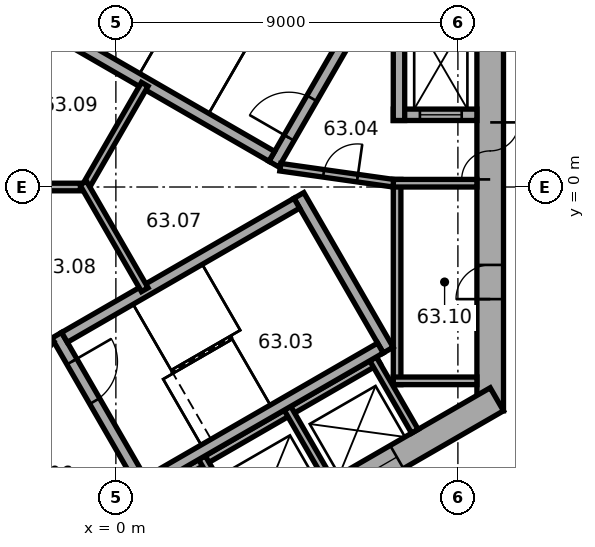
"""IFC4 building model, lengths in metres.
Left out: names, types, materials, properties, quantities, classifications, styles, units other than length and angle.
Written with IfcOpenShell. Run it as: python <this file> out.ifc"""

import sys

from ifc_helpers import new_model, si_unit, direction, frame, frame_2d, origin, place, context, subcontext, project, spatial, rectangle, extrude, element, fill, save


model = new_model("IFC4")
c1 = context("Model", 3, precision=1e-05, world=origin(), true_north=direction((0.0, 1.0)))
c2 = subcontext(c1, "Body", "Model", "MODEL_VIEW")
j1 = project(units=[si_unit("LENGTHUNIT", "METRE"), si_unit("PLANEANGLEUNIT", "RADIAN")], contexts=[c1])
p1 = place(None, origin())
s1 = spatial("IfcSite", under=j1, at=p1, CompositionType="ELEMENT")
p2 = place(p1, origin())
s2 = spatial("IfcBuilding", under=s1, at=p2, CompositionType="ELEMENT")
p3 = place(p2, frame((0.0, 0.0, 255.0)))
s3 = spatial("IfcBuildingStorey", under=s2, at=p3, CompositionType="ELEMENT", Elevation=255.0)
p4 = place(p3, frame((9.85, -5.889, 0.0), z_axis=(0.0, 0.0, 1.0), x_axis=(0.0, 1.0, 0.0)))
e1 = element("IfcWall", 1, at=p4, inside=s3, PredefinedType="SHEAR", context=c2, shape_type="SweptSolid", body=[
    extrude(rectangle(XDim=11.778, YDim=0.7, at=frame_2d((5.889, 0.0))), origin(), (0.0, 0.0, 1.0), 4.8),
])
p5 = place(p4, frame((6.089, 0.0, 0.0)))
e2 = element("IfcOpeningElement", 2, at=p5, cuts=e1, PredefinedType="OPENING", context=c2, shape_type="SweptSolid", body=[
    extrude(rectangle(XDim=1.5, YDim=2.1, at=frame_2d((0.75, 1.05))), frame((0.0, 0.36, 0.0), z_axis=(0.0, -1.0, 0.0), x_axis=(1.0, 0.0, 0.0)), (0.0, 0.0, 1.0), 0.72),
])
p6 = place(p4, frame((2.939, 0.0, 0.0)))
e3 = element("IfcOpeningElement", 3, at=p6, cuts=e1, PredefinedType="OPENING", context=c2, shape_type="SweptSolid", body=[
    extrude(rectangle(XDim=0.9, YDim=2.1, at=frame_2d((0.45, 1.05))), frame((0.0, 0.36, 0.0), z_axis=(0.0, -1.0, 0.0), x_axis=(1.0, 0.0, 0.0)), (0.0, 0.0, 1.0), 0.72),
])
p7 = place(p3, frame((-10.025, -5.586, 0.0), z_axis=(0.0, 0.0, 1.0), x_axis=(0.866026453023, -0.499998182661, 0.0)))
e4 = element("IfcWall", 4, at=p7, inside=s3, PredefinedType="SHEAR", context=c2, shape_type="SweptSolid", body=[
    extrude(rectangle(XDim=11.778, YDim=0.7, at=frame_2d((5.889, 0.0))), origin(), (0.0, 0.0, 1.0), 4.8),
])
p8 = place(p7, frame((6.089, 0.0, 0.0)))
e5 = element("IfcOpeningElement", 5, at=p8, cuts=e4, PredefinedType="OPENING", context=c2, shape_type="SweptSolid", body=[
    extrude(rectangle(XDim=1.5, YDim=2.1, at=frame_2d((0.75, 1.05))), frame((0.0, 0.36, 0.0), z_axis=(0.0, -1.0, 0.0), x_axis=(1.0, 0.0, 0.0)), (0.0, 0.0, 1.0), 0.72),
])
p9 = place(p7, frame((1.539, 0.0, 0.0)))
e6 = element("IfcOpeningElement", 6, at=p9, cuts=e4, PredefinedType="OPENING", context=c2, shape_type="SweptSolid", body=[
    extrude(rectangle(XDim=1.1, YDim=2.1, at=frame_2d((0.55, 1.05))), frame((0.0, 0.36, 0.0), z_axis=(0.0, -1.0, 0.0), x_axis=(1.0, 0.0, 0.0)), (0.0, 0.0, 1.0), 0.72),
])
p10 = place(p7, frame((4.139, 0.0, 0.0)))
e7 = element("IfcOpeningElement", 7, at=p10, cuts=e4, PredefinedType="OPENING", context=c2, shape_type="SweptSolid", body=[
    extrude(rectangle(XDim=1.1, YDim=2.1, at=frame_2d((0.55, 1.05))), frame((0.0, 0.36, 0.0), z_axis=(0.0, -1.0, 0.0), x_axis=(1.0, 0.0, 0.0)), (0.0, 0.0, 1.0), 0.72),
])
p11 = place(p3, frame((-0.175, -11.475, 0.0), z_axis=(0.0, 0.0, 1.0), x_axis=(0.866026453023, 0.499998182661, 0.0)))
e8 = element("IfcWall", 8, at=p11, inside=s3, PredefinedType="SHEAR", context=c2, shape_type="SweptSolid", body=[
    extrude(rectangle(XDim=11.778, YDim=0.7, at=frame_2d((5.889, 0.0))), origin(), (0.0, 0.0, 1.0), 4.8),
])
p12 = place(p11, frame((2.439, 0.0, 0.0)))
e9 = element("IfcOpeningElement", 9, at=p12, cuts=e8, PredefinedType="OPENING", context=c2, shape_type="SweptSolid", body=[
    extrude(rectangle(XDim=1.1, YDim=2.1, at=frame_2d((0.55, 1.05))), frame((0.0, 0.36, 0.0), z_axis=(0.0, -1.0, 0.0), x_axis=(1.0, 0.0, 0.0)), (0.0, 0.0, 1.0), 0.72),
])
p13 = place(p11, frame((5.039, 0.0, 0.0)))
e10 = element("IfcOpeningElement", 10, at=p13, cuts=e8, PredefinedType="OPENING", context=c2, shape_type="SweptSolid", body=[
    extrude(rectangle(XDim=1.1, YDim=2.1, at=frame_2d((0.55, 1.05))), frame((0.0, 0.36, 0.0), z_axis=(0.0, -1.0, 0.0), x_axis=(1.0, 0.0, 0.0)), (0.0, 0.0, 1.0), 0.72),
])
p14 = place(p11, frame((7.639, 0.0, 0.0)))
e11 = element("IfcOpeningElement", 11, at=p14, cuts=e8, PredefinedType="OPENING", context=c2, shape_type="SweptSolid", body=[
    extrude(rectangle(XDim=1.1, YDim=2.1, at=frame_2d((0.55, 1.05))), frame((0.0, 0.36, 0.0), z_axis=(0.0, -1.0, 0.0), x_axis=(1.0, 0.0, 0.0)), (0.0, 0.0, 1.0), 0.72),
])
p15 = place(p3, frame((7.4, -5.2, 0.0), z_axis=(0.0, 0.0, 1.0), x_axis=(0.0, 1.0, 0.0)))
e12 = element("IfcWall", 12, at=p15, inside=s3, PredefinedType="PARTITIONING", context=c2, shape_type="SweptSolid", body=[
    extrude(rectangle(XDim=5.4, YDim=0.2, at=frame_2d((2.7, 0.0))), origin(), (0.0, 0.0, 1.0), 4.52),
])
for number, where, z_axis, x_axis in (
    (13, (7.3, -5.1, 0.0), (0.0, 0.0, 1.0), (1.0, 0.0, 0.0)),
    (14, (7.3, 0.1, 0.0), (0.0, 0.0, 1.0), (1.0, 0.0, 0.0)),
):
    element("IfcWall", number, at=place(p3, frame(where, z_axis=z_axis, x_axis=x_axis)), inside=s3, PredefinedType="PARTITIONING", context=c2, shape_type="SweptSolid", body=[
        extrude(rectangle(XDim=2.2, YDim=0.2, at=frame_2d((1.1, 0.0))), origin(), (0.0, 0.0, 1.0), 4.52),
    ])
p16 = place(p3, frame((-0.024, -8.559, 0.0), z_axis=(0.0, 0.0, 1.0), x_axis=(0.866026010844, 0.49999894854, 0.0)))
e15 = element("IfcWall", 15, at=p16, inside=s3, PredefinedType="PARTITIONING", context=c2, shape_type="SweptSolid", body=[
    extrude(rectangle(XDim=8.0, YDim=0.2, at=frame_2d((4.0, 0.0))), origin(), (0.0, 0.0, 1.0), 4.52),
])
for number, where, z_axis, x_axis in (
    (16, (2.264, -7.122, 0.0), (0.0, 0.0, 1.0), (0.5, -0.866, 0.0)),
    (17, (4.516, -5.822, 0.0), (0.0, 0.0, 1.0), (0.5, -0.866, 0.0)),
    (18, (6.768, -4.522, 0.0), (0.0, 0.0, 1.0), (0.5, -0.866, 0.0)),
):
    element("IfcWall", number, at=place(p3, frame(where, z_axis=z_axis, x_axis=x_axis)), inside=s3, PredefinedType="PARTITIONING", context=c2, shape_type="SweptSolid", body=[
        extrude(rectangle(XDim=2.2, YDim=0.2, at=frame_2d((1.1, 0.0))), origin(), (0.0, 0.0, 1.0), 4.52),
    ])
p17 = place(p3, frame((4.158, 0.602, 0.0), z_axis=(0.0, 0.0, 1.0), x_axis=(0.499977259774, 0.866038532462, 0.0)))
e19 = element("IfcWall", 19, at=p17, inside=s3, PredefinedType="SHEAR", context=c2, shape_type="SweptSolid", body=[
    extrude(rectangle(XDim=4.7, YDim=0.3, at=frame_2d((2.35, 0.0))), origin(), (0.0, 0.0, 1.0), 4.52),
])
p18 = place(p17, frame((0.8, 0.0, 0.0)))
e20 = element("IfcOpeningElement", 20, at=p18, cuts=e19, PredefinedType="OPENING", context=c2, shape_type="SweptSolid", body=[
    extrude(rectangle(XDim=1.2, YDim=2.1, at=frame_2d((0.6, 1.05))), frame((0.0, 0.16, 0.0), z_axis=(0.0, -1.0, 0.0), x_axis=(1.0, 0.0, 0.0)), (0.0, 0.0, 1.0), 0.32),
])
p19 = place(p3, frame((4.103, 0.807, 0.0), z_axis=(0.0, 0.0, 1.0), x_axis=(-0.866027801685, 0.499995846692, 0.0)))
e21 = element("IfcWall", 21, at=p19, inside=s3, PredefinedType="SHEAR", context=c2, shape_type="SweptSolid", body=[
    extrude(rectangle(XDim=7.06, YDim=0.3, at=frame_2d((3.53, 0.0))), origin(), (0.0, 0.0, 1.0), 4.52),
])
p20 = place(p3, frame((-1.558, -3.902, 0.0), z_axis=(0.0, 0.0, 1.0), x_axis=(0.499977259774, -0.866038532462, 0.0)))
e22 = element("IfcWall", 22, at=p20, inside=s3, PredefinedType="SHEAR", context=c2, shape_type="SweptSolid", body=[
    extrude(rectangle(XDim=4.7, YDim=0.3, at=frame_2d((2.35, 0.0))), origin(), (0.0, 0.0, 1.0), 4.52),
])
p21 = place(p20, frame((0.8, 0.0, 0.0)))
e23 = element("IfcOpeningElement", 23, at=p21, cuts=e22, PredefinedType="OPENING", context=c2, shape_type="SweptSolid", body=[
    extrude(rectangle(XDim=1.2, YDim=2.1, at=frame_2d((0.6, 1.05))), frame((0.0, 0.16, 0.0), z_axis=(0.0, -1.0, 0.0), x_axis=(1.0, 0.0, 0.0)), (0.0, 0.0, 1.0), 0.32),
])
p22 = place(p3, frame((4.816, -0.222, 0.0), z_axis=(0.0, 0.0, 1.0), x_axis=(0.499977259774, -0.866038532462, 0.0)))
e24 = element("IfcWall", 24, at=p22, inside=s3, PredefinedType="SHEAR", context=c2, shape_type="SweptSolid", body=[
    extrude(rectangle(XDim=4.7, YDim=0.3, at=frame_2d((2.35, 0.0))), origin(), (0.0, 0.0, 1.0), 4.52),
])
for number, where, z_axis, x_axis in (
    (25, (-1.353, -3.957, 0.0), (0.0, 0.0, 1.0), (0.866, 0.5, 0.0)),
    (26, (0.847, -7.767, 0.0), (0.0, 0.0, 1.0), (0.866, 0.5, 0.0)),
):
    element("IfcWall", number, at=place(p3, frame(where, z_axis=z_axis, x_axis=x_axis)), inside=s3, PredefinedType="SHEAR", context=c2, shape_type="SweptSolid", body=[
        extrude(rectangle(XDim=7.06, YDim=0.3, at=frame_2d((3.53, 0.0))), origin(), (0.0, 0.0, 1.0), 4.52),
    ])
p23 = place(p3, frame((7.3, 1.9, 0.0), z_axis=(0.0, 0.0, 1.0), x_axis=(1.0, 0.0, 0.0)))
e27 = element("IfcWall", 27, at=p23, inside=s3, PredefinedType="SHEAR", context=c2, shape_type="SweptSolid", body=[
    extrude(rectangle(XDim=2.2, YDim=0.3, at=frame_2d((1.1, 0.0))), origin(), (0.0, 0.0, 1.0), 4.52),
])
p24 = place(p23, frame((0.7, 0.0, 0.0)))
e28 = element("IfcOpeningElement", 28, at=p24, cuts=e27, PredefinedType="OPENING", context=c2, shape_type="SweptSolid", body=[
    extrude(rectangle(XDim=1.1, YDim=2.1, at=frame_2d((0.55, 1.05))), frame((0.0, 0.16, 0.0), z_axis=(0.0, -1.0, 0.0), x_axis=(1.0, 0.0, 0.0)), (0.0, 0.0, 1.0), 0.32),
])
p25 = place(p3, frame((7.45, 1.75, 0.0), z_axis=(0.0, 0.0, 1.0), x_axis=(0.0, 1.0, 0.0)))
e29 = element("IfcWall", 29, at=p25, inside=s3, PredefinedType="SHEAR", context=c2, shape_type="SweptSolid", body=[
    extrude(rectangle(XDim=3.35, YDim=0.3, at=frame_2d((1.675, 0.0))), origin(), (0.0, 0.0, 1.0), 4.52),
])
p26 = place(p3, frame((4.327, 0.521, 0.0), z_axis=(0.0, 0.0, 1.0), x_axis=(0.990124376366, -0.14019172346, 0.0)))
e30 = element("IfcWall", 30, at=p26, inside=s3, PredefinedType="PARTITIONING", context=c2, shape_type="SweptSolid", body=[
    extrude(rectangle(XDim=3.002, YDim=0.2, at=frame_2d((1.501, 0.0))), origin(), (0.0, 0.0, 1.0), 4.52),
])
p27 = place(p26, frame((1.15, 0.0, 0.0)))
e31 = element("IfcOpeningElement", 31, at=p27, cuts=e30, PredefinedType="OPENING", context=c2, shape_type="SweptSolid", body=[
    extrude(rectangle(XDim=0.9, YDim=2.1, at=frame_2d((0.45, 1.05))), frame((0.0, 0.11, 0.0), z_axis=(0.0, -1.0, 0.0), x_axis=(1.0, 0.0, 0.0)), (0.0, 0.0, 1.0), 0.22),
])
p28 = place(p3, frame((-1.712, -4.008, 0.0), z_axis=(0.0, 0.0, 1.0), x_axis=(-0.616549420702, -0.787316208287, 0.0)))
e32 = element("IfcWall", 32, at=p28, inside=s3, PredefinedType="PARTITIONING", context=c2, shape_type="SweptSolid", body=[
    extrude(rectangle(XDim=3.002, YDim=0.2, at=frame_2d((1.501, 0.0))), origin(), (0.0, 0.0, 1.0), 4.52),
])
p29 = place(p28, frame((1.15, 0.0, 0.0)))
e33 = element("IfcOpeningElement", 33, at=p29, cuts=e32, PredefinedType="OPENING", context=c2, shape_type="SweptSolid", body=[
    extrude(rectangle(XDim=0.9, YDim=2.1, at=frame_2d((0.45, 1.05))), frame((0.0, 0.11, 0.0), z_axis=(0.0, -1.0, 0.0), x_axis=(1.0, 0.0, 0.0)), (0.0, 0.0, 1.0), 0.22),
])
p30 = place(p3, frame((-0.68, 0.0, 0.0), z_axis=(0.0, 0.0, 1.0), x_axis=(-1.0, 0.0, 0.0)))
e34 = element("IfcWall", 34, at=p30, inside=s3, PredefinedType="PARTITIONING", context=c2, shape_type="SweptSolid", body=[
    extrude(rectangle(XDim=2.04, YDim=0.2, at=frame_2d((1.02, 0.0))), origin(), (0.0, 0.0, 1.0), 4.52),
])
for number, where, z_axis, x_axis in (
    (35, (-0.86, -0.104, 0.0), (0.0, 0.0, 1.0), (0.5, 0.866, 0.0)),
    (36, (-0.86, 0.104, 0.0), (0.0, 0.0, 1.0), (0.5, -0.866, 0.0)),
):
    element("IfcWall", number, at=place(p3, frame(where, z_axis=z_axis, x_axis=x_axis)), inside=s3, PredefinedType="PARTITIONING", context=c2, shape_type="SweptSolid", body=[
        extrude(rectangle(XDim=3.24, YDim=0.2, at=frame_2d((1.62, 0.0))), origin(), (0.0, 0.0, 1.0), 4.52),
    ])
p31 = place(p5, origin())
e37 = element("IfcDoor", 37, at=p31, inside=s3, OperationType="DOUBLE_DOOR_SINGLE_SWING", PredefinedType="DOOR", context=c2, shape_type="SweptSolid", body=[
    extrude(rectangle(XDim=1.5, YDim=2.1, at=frame_2d((0.75, 1.05))), frame((0.0, 0.025, 0.0), z_axis=(0.0, -1.0, 0.0), x_axis=(1.0, 0.0, 0.0)), (0.0, 0.0, 1.0), 0.05),
])
fill(e2, e37)
p32 = place(p18, origin())
e38 = element("IfcDoor", 38, at=p32, inside=s3, OperationType="SINGLE_SWING_RIGHT", PredefinedType="DOOR", context=c2, shape_type="SweptSolid", body=[
    extrude(rectangle(XDim=1.2, YDim=2.1, at=frame_2d((0.6, 1.05))), frame((0.0, 0.025, 0.0), z_axis=(0.0, -1.0, 0.0), x_axis=(1.0, 0.0, 0.0)), (0.0, 0.0, 1.0), 0.05),
])
fill(e20, e38)
p33 = place(p21, origin())
e39 = element("IfcDoor", 39, at=p33, inside=s3, OperationType="SINGLE_SWING_RIGHT", PredefinedType="DOOR", context=c2, shape_type="SweptSolid", body=[
    extrude(rectangle(XDim=1.2, YDim=2.1, at=frame_2d((0.6, 1.05))), frame((0.0, 0.025, 0.0), z_axis=(0.0, -1.0, 0.0), x_axis=(1.0, 0.0, 0.0)), (0.0, 0.0, 1.0), 0.05),
])
fill(e23, e39)
p34 = place(p27, origin())
e40 = element("IfcDoor", 40, at=p34, inside=s3, OperationType="SINGLE_SWING_LEFT", PredefinedType="DOOR", context=c2, shape_type="SweptSolid", body=[
    extrude(rectangle(XDim=0.9, YDim=2.1, at=frame_2d((0.45, 1.05))), frame((0.0, 0.025, 0.0), z_axis=(0.0, -1.0, 0.0), x_axis=(1.0, 0.0, 0.0)), (0.0, 0.0, 1.0), 0.05),
])
fill(e31, e40)
p35 = place(p6, origin())
e41 = element("IfcDoor", 41, at=p35, inside=s3, OperationType="SINGLE_SWING_LEFT", PredefinedType="DOOR", context=c2, shape_type="SweptSolid", body=[
    extrude(rectangle(XDim=0.9, YDim=2.1, at=frame_2d((0.45, 1.05))), frame((0.0, 0.025, 0.0), z_axis=(0.0, -1.0, 0.0), x_axis=(1.0, 0.0, 0.0)), (0.0, 0.0, 1.0), 0.05),
])
fill(e3, e41)
p36 = place(p24, origin())
e42 = element("IfcDoor", 42, at=p36, inside=s3, OperationType="DOUBLE_DOOR_SLIDING", PredefinedType="DOOR", context=c2, shape_type="SweptSolid", body=[
    extrude(rectangle(XDim=1.1, YDim=2.1, at=frame_2d((0.55, 1.05))), frame((0.0, 0.025, 0.0), z_axis=(0.0, -1.0, 0.0), x_axis=(1.0, 0.0, 0.0)), (0.0, 0.0, 1.0), 0.05),
])
fill(e28, e42)
p37 = place(p14, origin())
e43 = element("IfcDoor", 43, at=p37, inside=s3, OperationType="DOUBLE_DOOR_SLIDING", PredefinedType="DOOR", context=c2, shape_type="SweptSolid", body=[
    extrude(rectangle(XDim=1.1, YDim=2.1, at=frame_2d((0.55, 1.05))), frame((0.0, 0.025, 0.0), z_axis=(0.0, -1.0, 0.0), x_axis=(1.0, 0.0, 0.0)), (0.0, 0.0, 1.0), 0.05),
])
fill(e11, e43)
save(model, sys.argv[1])
